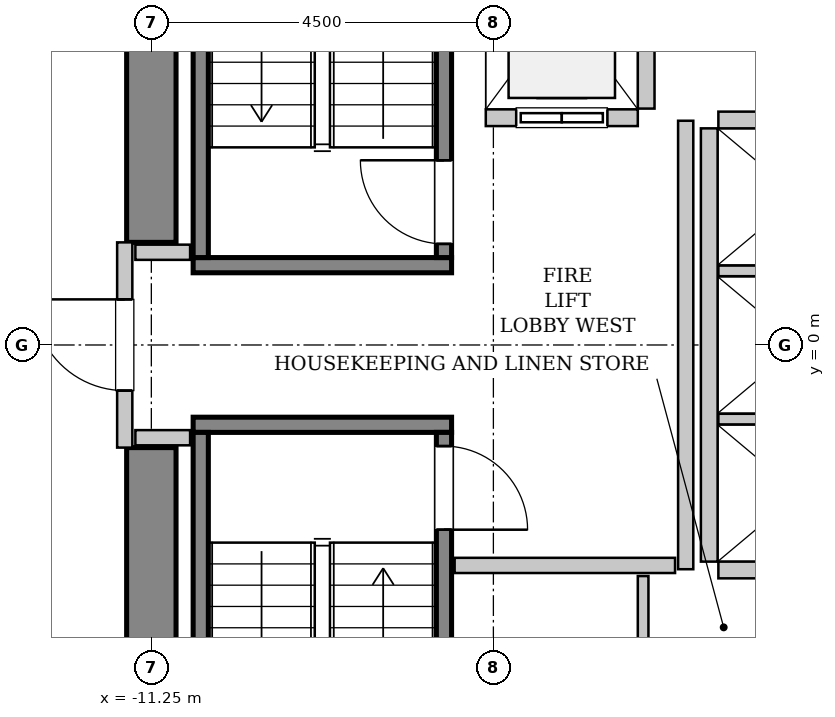
"""IFC4 building model, lengths in metres.
Left out: names, types, materials, properties, quantities, classifications, styles, units other than length and angle.
Written with IfcOpenShell. Run it as: python <this file> out.ifc"""

import sys

from ifc_helpers import new_model, si_unit, direction, frame, frame_2d, origin, place, context, subcontext, project, spatial, rectangle, extrude, source, transform, mapped, element, fill, save


model = new_model("IFC4")
c1 = context("Model", 3, precision=1e-05, world=origin(), true_north=direction((0.0, 1.0)))
c2 = subcontext(c1, "Body", "Model", "MODEL_VIEW")
j1 = project(units=[si_unit("LENGTHUNIT", "METRE"), si_unit("PLANEANGLEUNIT", "RADIAN")], contexts=[c1])
p1 = place(None, origin())
s1 = spatial("IfcSite", under=j1, at=p1, CompositionType="ELEMENT")
p2 = place(p1, origin())
s2 = spatial("IfcBuilding", under=s1, at=p2, CompositionType="ELEMENT")
p3 = place(p2, frame((0.0, 0.0, 71.0)))
s3 = spatial("IfcBuildingStorey", under=s2, at=p3, CompositionType="ELEMENT", Elevation=71.0)
m1 = source(origin(), c2, "Body", "SweptSolid", [
    extrude(rectangle(XDim=7.325, YDim=0.65, at=frame_2d((3.663, 0.0))), origin(), (0.0, 0.0, 1.0), 3.8),
])
for number, where, z_axis, x_axis in (
    (1, (-11.25, -8.675, 0.0), (0.0, 0.0, 1.0), (0.0, 1.0, 0.0)),
    (2, (-11.25, 1.35, 0.0), (0.0, 0.0, 1.0), (0.0, 1.0, 0.0)),
):
    element("IfcWall", number, at=place(p3, frame(where, z_axis=z_axis, x_axis=x_axis)), inside=s3, PredefinedType="SHEAR", context=c2, shape_type="MappedRepresentation", body=[
        mapped(m1, transform((0.0, 0.0, 0.0), x_axis=(1.0, 0.0, 0.0), y_axis=(0.0, 1.0, 0.0), z_axis=(0.0, 0.0, 1.0), scale=1.0)),
    ])
m2 = source(origin(), c2, "Body", "SweptSolid", [
    extrude(rectangle(XDim=3.4, YDim=0.2, at=frame_2d((1.7, 0.0))), origin(), (0.0, 0.0, 1.0), 3.8),
])
p4 = place(p3, frame((-7.3, 1.05, 0.0), z_axis=(0.0, 0.0, 1.0), x_axis=(-1.0, 0.0, 0.0)))
e3 = element("IfcWall", 3, at=p4, inside=s3, PredefinedType="SOLIDWALL", context=c2, shape_type="MappedRepresentation", body=[
    mapped(m2, transform((0.0, 0.0, 0.0), x_axis=(1.0, 0.0, 0.0), y_axis=(0.0, 1.0, 0.0), z_axis=(0.0, 0.0, 1.0), scale=1.0)),
])
m3 = source(origin(), c2, "Body", "SweptSolid", [
    extrude(rectangle(XDim=7.1, YDim=0.2, at=frame_2d((3.55, 0.0))), origin(), (0.0, 0.0, 1.0), 3.8),
])
p5 = place(p3, frame((-7.4, 1.15, 0.0), z_axis=(0.0, 0.0, 1.0), x_axis=(0.0, 1.0, 0.0)))
e4 = element("IfcWall", 4, at=p5, inside=s3, PredefinedType="SOLIDWALL", context=c2, shape_type="MappedRepresentation", body=[
    mapped(m3, transform((0.0, 0.0, 0.0), x_axis=(1.0, 0.0, 0.0), y_axis=(0.0, 1.0, 0.0), z_axis=(0.0, 0.0, 1.0), scale=1.0)),
])
p6 = place(p5, frame((0.18, 0.0, 0.0)))
e5 = element("IfcOpeningElement", 5, at=p6, cuts=e4, PredefinedType="OPENING", context=c2, shape_type="SweptSolid", body=[
    extrude(rectangle(XDim=1.1, YDim=2.15, at=frame_2d((0.55, 1.075))), frame((0.0, 0.11, 0.0), z_axis=(0.0, -1.0, 0.0), x_axis=(1.0, 0.0, 0.0)), (0.0, 0.0, 1.0), 0.22),
])
p7 = place(p3, frame((-10.6, 1.15, 0.0), z_axis=(0.0, 0.0, 1.0), x_axis=(0.0, 1.0, 0.0)))
e6 = element("IfcWall", 6, at=p7, inside=s3, PredefinedType="SOLIDWALL", context=c2, shape_type="MappedRepresentation", body=[
    mapped(m3, transform((0.0, 0.0, 0.0), x_axis=(1.0, 0.0, 0.0), y_axis=(0.0, 1.0, 0.0), z_axis=(0.0, 0.0, 1.0), scale=1.0)),
])
p8 = place(p3, frame((-10.7, -1.05, 0.0), z_axis=(0.0, 0.0, 1.0), x_axis=(1.0, 0.0, 0.0)))
e7 = element("IfcWall", 7, at=p8, inside=s3, PredefinedType="SOLIDWALL", context=c2, shape_type="MappedRepresentation", body=[
    mapped(m2, transform((0.0, 0.0, 0.0), x_axis=(1.0, 0.0, 0.0), y_axis=(0.0, 1.0, 0.0), z_axis=(0.0, 0.0, 1.0), scale=1.0)),
])
p9 = place(p3, frame((-10.6, -1.15, 0.0), z_axis=(0.0, 0.0, 1.0), x_axis=(0.0, -1.0, 0.0)))
e8 = element("IfcWall", 8, at=p9, inside=s3, PredefinedType="SOLIDWALL", context=c2, shape_type="MappedRepresentation", body=[
    mapped(m3, transform((0.0, 0.0, 0.0), x_axis=(1.0, 0.0, 0.0), y_axis=(0.0, 1.0, 0.0), z_axis=(0.0, 0.0, 1.0), scale=1.0)),
])
p10 = place(p3, frame((-7.4, -1.15, 0.0), z_axis=(0.0, 0.0, 1.0), x_axis=(0.0, -1.0, 0.0)))
e9 = element("IfcWall", 9, at=p10, inside=s3, PredefinedType="SOLIDWALL", context=c2, shape_type="MappedRepresentation", body=[
    mapped(m3, transform((0.0, 0.0, 0.0), x_axis=(1.0, 0.0, 0.0), y_axis=(0.0, 1.0, 0.0), z_axis=(0.0, 0.0, 1.0), scale=1.0)),
])
p11 = place(p10, frame((0.18, 0.0, 0.0)))
e10 = element("IfcOpeningElement", 10, at=p11, cuts=e9, PredefinedType="OPENING", context=c2, shape_type="SweptSolid", body=[
    extrude(rectangle(XDim=1.1, YDim=2.15, at=frame_2d((0.55, 1.075))), frame((0.0, 0.11, 0.0), z_axis=(0.0, -1.0, 0.0), x_axis=(1.0, 0.0, 0.0)), (0.0, 0.0, 1.0), 0.22),
])
m4 = source(origin(), c2, "Body", "SweptSolid", [
    extrude(rectangle(XDim=2.0, YDim=0.22, at=frame_2d((1.0, 0.0))), origin(), (0.0, 0.0, 1.0), 3.535),
])
p12 = place(p3, frame((-6.85, 2.99, 0.0), z_axis=(0.0, 0.0, 1.0), x_axis=(1.0, 0.0, 0.0)))
e11 = element("IfcWall", 11, at=p12, inside=s3, PredefinedType="SOLIDWALL", context=c2, shape_type="MappedRepresentation", body=[
    mapped(m4, transform((0.0, 0.0, 0.0), x_axis=(1.0, 0.0, 0.0), y_axis=(0.0, 1.0, 0.0), z_axis=(0.0, 0.0, 1.0), scale=1.0)),
])
p13 = place(p12, frame((0.4, 0.0, 0.0)))
e12 = element("IfcOpeningElement", 12, at=p13, cuts=e11, PredefinedType="OPENING", context=c2, shape_type="SweptSolid", body=[
    extrude(rectangle(XDim=1.2, YDim=2.2, at=frame_2d((0.6, 1.1))), frame((0.0, 0.12, 0.0), z_axis=(0.0, -1.0, 0.0), x_axis=(1.0, 0.0, 0.0)), (0.0, 0.0, 1.0), 0.24),
])
m5 = source(origin(), c2, "Body", "SweptSolid", [
    extrude(rectangle(XDim=2.68, YDim=0.22, at=frame_2d((1.34, 0.0))), origin(), (0.0, 0.0, 1.0), 3.535),
])
p14 = place(p3, frame((-4.74, 3.11, 0.0), z_axis=(0.0, 0.0, 1.0), x_axis=(0.0, 1.0, 0.0)))
e13 = element("IfcWall", 13, at=p14, inside=s3, PredefinedType="SOLIDWALL", context=c2, shape_type="MappedRepresentation", body=[
    mapped(m5, transform((0.0, 0.0, 0.0), x_axis=(1.0, 0.0, 0.0), y_axis=(0.0, 1.0, 0.0), z_axis=(0.0, 0.0, 1.0), scale=1.0)),
])
m6 = source(origin(), c2, "Body", "SweptSolid", [
    extrude(rectangle(XDim=5.7, YDim=0.22, at=frame_2d((2.85, 0.0))), origin(), (0.0, 0.0, 1.0), 3.535),
])
p15 = place(p3, frame((-3.91, 2.85, 0.0), z_axis=(0.0, 0.0, 1.0), x_axis=(0.0, -1.0, 0.0)))
e14 = element("IfcWall", 14, at=p15, inside=s3, PredefinedType="SOLIDWALL", context=c2, shape_type="MappedRepresentation", body=[
    mapped(m6, transform((0.0, 0.0, 0.0), x_axis=(1.0, 0.0, 0.0), y_axis=(0.0, 1.0, 0.0), z_axis=(0.0, 0.0, 1.0), scale=1.0)),
])
m7 = source(origin(), c2, "Body", "SweptSolid", [
    extrude(rectangle(XDim=2.13, YDim=0.22, at=frame_2d((1.065, 0.0))), origin(), (0.0, 0.0, 1.0), 3.535),
])
p16 = place(p3, frame((-3.79, -2.96, 0.0), z_axis=(0.0, 0.0, 1.0), x_axis=(1.0, 0.0, 0.0)))
e15 = element("IfcWall", 15, at=p16, inside=s3, PredefinedType="SOLIDWALL", context=c2, shape_type="MappedRepresentation", body=[
    mapped(m7, transform((0.0, 0.0, 0.0), x_axis=(1.0, 0.0, 0.0), y_axis=(0.0, 1.0, 0.0), z_axis=(0.0, 0.0, 1.0), scale=1.0)),
])
m8 = source(origin(), c2, "Body", "SweptSolid", [
    extrude(rectangle(XDim=2.13, YDim=0.14, at=frame_2d((1.065, 0.0))), origin(), (0.0, 0.0, 1.0), 3.535),
])
for number, where, z_axis, x_axis in (
    (16, (-3.79, -0.975, 0.0), (0.0, 0.0, 1.0), (1.0, 0.0, 0.0)),
    (17, (-3.79, 0.975, 0.0), (0.0, 0.0, 1.0), (1.0, 0.0, 0.0)),
):
    element("IfcWall", number, at=place(p3, frame(where, z_axis=z_axis, x_axis=x_axis)), inside=s3, PredefinedType="PARTITIONING", context=c2, shape_type="MappedRepresentation", body=[
        mapped(m8, transform((0.0, 0.0, 0.0), x_axis=(1.0, 0.0, 0.0), y_axis=(0.0, 1.0, 0.0), z_axis=(0.0, 0.0, 1.0), scale=1.0)),
    ])
p17 = place(p3, frame((-1.66, 2.96, 0.0), z_axis=(0.0, 0.0, 1.0), x_axis=(-1.0, 0.0, 0.0)))
e18 = element("IfcWall", 18, at=p17, inside=s3, PredefinedType="SOLIDWALL", context=c2, shape_type="MappedRepresentation", body=[
    mapped(m7, transform((0.0, 0.0, 0.0), x_axis=(1.0, 0.0, 0.0), y_axis=(0.0, 1.0, 0.0), z_axis=(0.0, 0.0, 1.0), scale=1.0)),
])
m9 = source(origin(), c2, "Body", "SweptSolid", [
    extrude(rectangle(XDim=2.7, YDim=0.2, at=frame_2d((1.35, 0.0))), origin(), (0.0, 0.0, 1.0), 2.425),
])
p18 = place(p3, frame((-11.6, -1.35, 0.0), z_axis=(0.0, 0.0, 1.0), x_axis=(0.0, 1.0, 0.0)))
e19 = element("IfcWall", 19, at=p18, inside=s3, PredefinedType="PARTITIONING", context=c2, shape_type="MappedRepresentation", body=[
    mapped(m9, transform((0.0, 0.0, 0.0), x_axis=(1.0, 0.0, 0.0), y_axis=(0.0, 1.0, 0.0), z_axis=(0.0, 0.0, 1.0), scale=1.0)),
])
p19 = place(p18, frame((0.75, 0.0, 0.0)))
e20 = element("IfcOpeningElement", 20, at=p19, cuts=e19, PredefinedType="OPENING", context=c2, shape_type="SweptSolid", body=[
    extrude(rectangle(XDim=1.2, YDim=2.15, at=frame_2d((0.6, 1.075))), frame((0.0, 0.11, 0.0), z_axis=(0.0, -1.0, 0.0), x_axis=(1.0, 0.0, 0.0)), (0.0, 0.0, 1.0), 0.22),
])
m10 = source(origin(), c2, "Body", "SweptSolid", [
    extrude(rectangle(XDim=5.9, YDim=0.2, at=frame_2d((2.95, 0.0))), origin(), (0.0, 0.0, 1.0), 3.535),
])
p20 = place(p3, frame((-4.22, -2.95, 0.0), z_axis=(0.0, 0.0, 1.0), x_axis=(0.0, 1.0, 0.0)))
e21 = element("IfcWall", 21, at=p20, inside=s3, PredefinedType="PARTITIONING", context=c2, shape_type="MappedRepresentation", body=[
    mapped(m10, transform((0.0, 0.0, 0.0), x_axis=(1.0, 0.0, 0.0), y_axis=(0.0, 1.0, 0.0), z_axis=(0.0, 0.0, 1.0), scale=1.0)),
])
m11 = source(origin(), c2, "Body", "SweptSolid", [
    extrude(rectangle(XDim=2.9, YDim=0.2, at=frame_2d((1.45, 0.0))), origin(), (0.0, 0.0, 1.0), 3.535),
])
p21 = place(p3, frame((-7.26, -2.9, 0.0), z_axis=(0.0, 0.0, 1.0), x_axis=(1.0, 0.0, 0.0)))
e22 = element("IfcWall", 22, at=p21, inside=s3, PredefinedType="PARTITIONING", context=c2, shape_type="MappedRepresentation", body=[
    mapped(m11, transform((0.0, 0.0, 0.0), x_axis=(1.0, 0.0, 0.0), y_axis=(0.0, 1.0, 0.0), z_axis=(0.0, 0.0, 1.0), scale=1.0)),
])
m12 = source(origin(), c2, "Body", "SweptSolid", [
    extrude(rectangle(XDim=0.72, YDim=0.2, at=frame_2d((0.36, 0.0))), origin(), (0.0, 0.0, 1.0), 3.535),
])
for number, where, z_axis, x_axis in (
    (23, (-11.46, 1.22, 0.0), (0.0, 0.0, 1.0), (1.0, 0.0, 0.0)),
    (24, (-11.46, -1.22, 0.0), (0.0, 0.0, 1.0), (1.0, 0.0, 0.0)),
):
    element("IfcWall", number, at=place(p3, frame(where, z_axis=z_axis, x_axis=x_axis)), inside=s3, PredefinedType="PARTITIONING", context=c2, shape_type="MappedRepresentation", body=[
        mapped(m12, transform((0.0, 0.0, 0.0), x_axis=(1.0, 0.0, 0.0), y_axis=(0.0, 1.0, 0.0), z_axis=(0.0, 0.0, 1.0), scale=1.0)),
    ])
m13 = source(origin(), c2, "Body", "SweptSolid", [
    extrude(rectangle(XDim=1.26, YDim=0.14, at=frame_2d((0.63, 0.0))), origin(), (0.0, 0.0, 1.0), 3.535),
])
p22 = place(p3, frame((-4.78, -4.3, 0.0), z_axis=(0.0, 0.0, 1.0), x_axis=(0.0, 1.0, 0.0)))
e25 = element("IfcWall", 25, at=p22, inside=s3, PredefinedType="PARTITIONING", context=c2, shape_type="MappedRepresentation", body=[
    mapped(m13, transform((0.0, 0.0, 0.0), x_axis=(1.0, 0.0, 0.0), y_axis=(0.0, 1.0, 0.0), z_axis=(0.0, 0.0, 1.0), scale=1.0)),
])
m14 = source(origin(), c2, "Body", "SweptSolid", [
    extrude(rectangle(XDim=1.1, YDim=2.15, at=frame_2d((0.55, 1.075))), frame((0.0, 0.025, 0.0), z_axis=(0.0, -1.0, 0.0), x_axis=(1.0, 0.0, 0.0)), (0.0, 0.0, 1.0), 0.05),
])
p23 = place(p6, origin())
e26 = element("IfcDoor", 26, at=p23, inside=s3, OperationType="SINGLE_SWING_RIGHT", PredefinedType="DOOR", context=c2, shape_type="MappedRepresentation", body=[
    mapped(m14, transform((0.0, 0.0, 0.0), x_axis=(1.0, 0.0, 0.0), y_axis=(0.0, 1.0, 0.0), z_axis=(0.0, 0.0, 1.0), scale=1.0)),
])
fill(e5, e26)
p24 = place(p11, origin())
e27 = element("IfcDoor", 27, at=p24, inside=s3, OperationType="SINGLE_SWING_RIGHT", PredefinedType="DOOR", context=c2, shape_type="MappedRepresentation", body=[
    mapped(m14, transform((0.0, 0.0, 0.0), x_axis=(1.0, 0.0, 0.0), y_axis=(0.0, 1.0, 0.0), z_axis=(0.0, 0.0, 1.0), scale=1.0)),
])
fill(e10, e27)
m15 = source(origin(), c2, "Body", "SweptSolid", [
    extrude(rectangle(XDim=1.2, YDim=2.2, at=frame_2d((0.6, 1.1))), frame((0.0, 0.025, 0.0), z_axis=(0.0, -1.0, 0.0), x_axis=(1.0, 0.0, 0.0)), (0.0, 0.0, 1.0), 0.05),
])
p25 = place(p13, origin())
e28 = element("IfcDoor", 28, at=p25, inside=s3, OperationType="SLIDING_TO_LEFT", PredefinedType="DOOR", context=c2, shape_type="MappedRepresentation", body=[
    mapped(m15, transform((0.0, 0.0, 0.0), x_axis=(1.0, 0.0, 0.0), y_axis=(0.0, 1.0, 0.0), z_axis=(0.0, 0.0, 1.0), scale=1.0)),
])
fill(e12, e28)
m16 = source(origin(), c2, "Body", "SweptSolid", [
    extrude(rectangle(XDim=1.2, YDim=2.15, at=frame_2d((0.6, 1.075))), frame((0.0, 0.025, 0.0), z_axis=(0.0, -1.0, 0.0), x_axis=(1.0, 0.0, 0.0)), (0.0, 0.0, 1.0), 0.05),
])
p26 = place(p19, origin())
e29 = element("IfcDoor", 29, at=p26, inside=s3, OperationType="SINGLE_SWING_RIGHT", PredefinedType="DOOR", context=c2, shape_type="MappedRepresentation", body=[
    mapped(m16, transform((0.0, 0.0, 0.0), x_axis=(1.0, 0.0, 0.0), y_axis=(0.0, 1.0, 0.0), z_axis=(0.0, 0.0, 1.0), scale=1.0)),
])
fill(e20, e29)
save(model, sys.argv[1])
